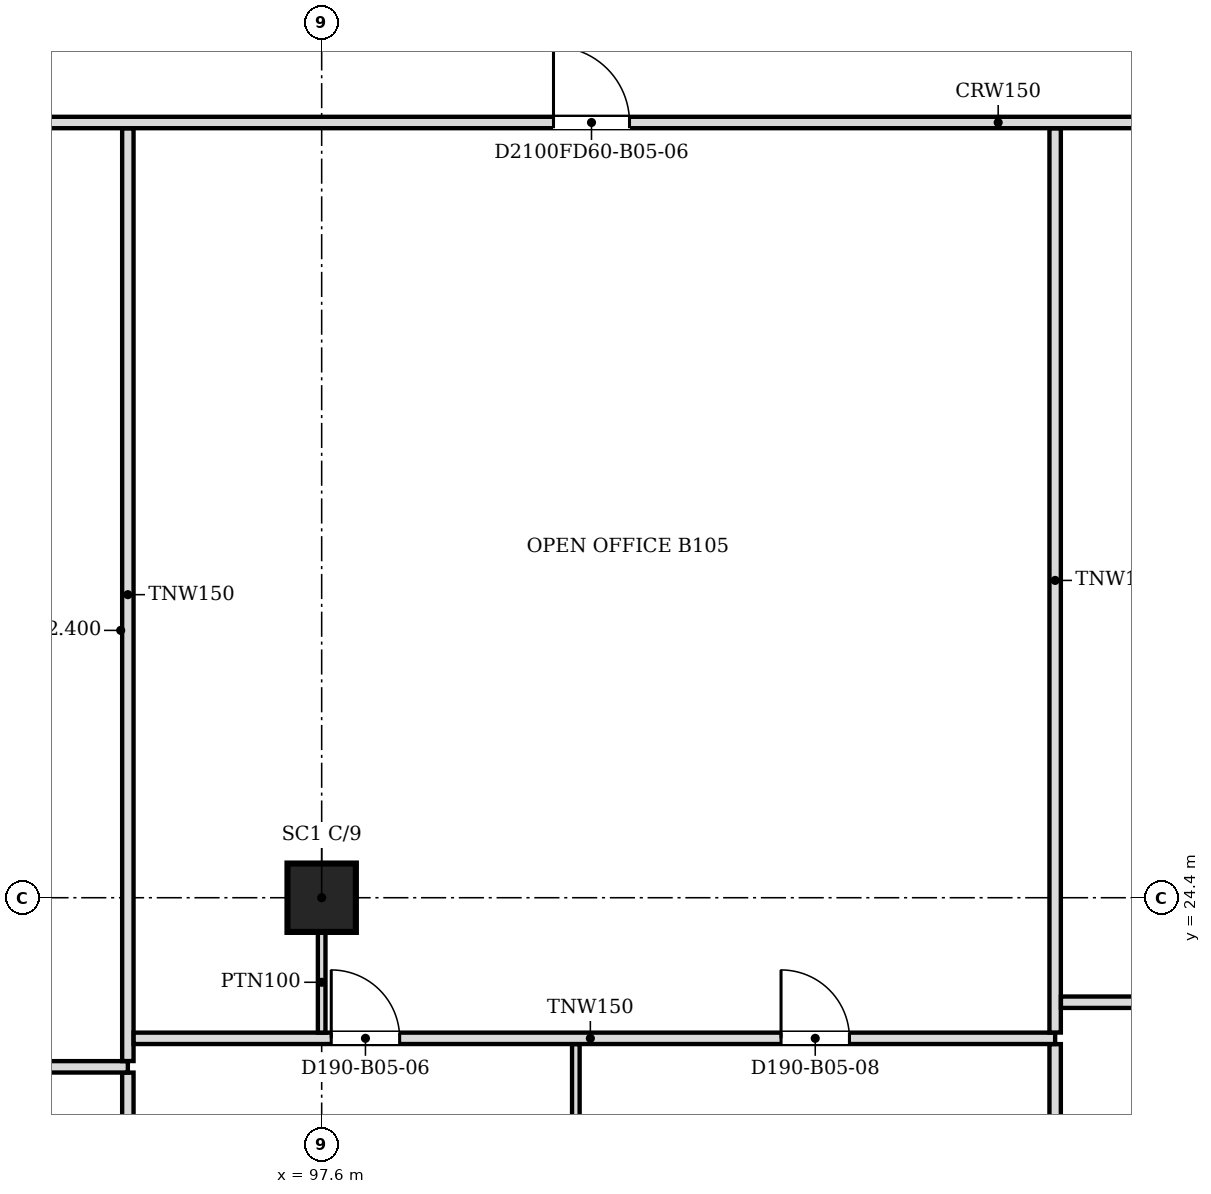
"""IFC4 building model, lengths in metres.
Left out: names, types, materials, properties, quantities, classifications, styles, units other than length and angle.
Written with IfcOpenShell. Run it as: python <this file> out.ifc"""

import sys

from ifc_helpers import new_model, si_unit, direction, frame, frame_2d, origin, origin_2d, place, context, subcontext, project, spatial, rectangle, extrude, source, transform, mapped, element, fill, save


model = new_model("IFC4")
c1 = context("Model", 3, precision=1e-05, world=origin(), true_north=direction((0.0, 1.0)))
c2 = subcontext(c1, "Body", "Model", "MODEL_VIEW")
j1 = project(units=[si_unit("LENGTHUNIT", "METRE"), si_unit("PLANEANGLEUNIT", "RADIAN")], contexts=[c1])
p1 = place(None, origin())
s1 = spatial("IfcSite", under=j1, at=p1, CompositionType="ELEMENT")
p2 = place(p1, origin())
s2 = spatial("IfcBuilding", under=s1, at=p2, CompositionType="ELEMENT")
p3 = place(p2, frame((0.0, 0.0, 52.4)))
s3 = spatial("IfcBuildingStorey", under=s2, at=p3, CompositionType="ELEMENT", Elevation=52.4)
p4 = place(p3, frame((97.6, 24.4, 0.0), z_axis=(0.0, 0.0, 1.0), x_axis=(1.0, 0.0, 0.0)))
e1 = element("IfcColumn", 1, at=p4, inside=s3, PredefinedType="COLUMN", context=c2, shape_type="SweptSolid", body=[
    extrude(rectangle(XDim=0.9, YDim=0.9, at=origin_2d()), origin(), (0.0, 0.0, 1.0), 3.6),
])
p5 = place(p3, frame((95.05, 18.8, 0.0), z_axis=(0.0, 0.0, 1.0), x_axis=(0.0, 1.0, 0.0)))
e2 = element("IfcWall", 2, at=p5, inside=s3, PredefinedType="PARTITIONING", context=c2, shape_type="SweptSolid", body=[
    extrude(rectangle(XDim=3.299, YDim=0.15, at=frame_2d((1.649, 0.0))), origin(), (0.0, 0.0, 1.0), 3.067),
])
p6 = place(p3, frame((100.944, 18.8, 0.0), z_axis=(0.0, 0.0, 1.0), x_axis=(0.0, 1.0, 0.0)))
e3 = element("IfcWall", 3, at=p6, inside=s3, PredefinedType="PARTITIONING", context=c2, shape_type="SweptSolid", body=[
    extrude(rectangle(XDim=3.674, YDim=0.1, at=frame_2d((1.837, 0.0))), origin(), (0.0, 0.0, 1.0), 3.067),
])
p7 = place(p3, frame((107.25, 18.8, 0.0), z_axis=(0.0, 0.0, 1.0), x_axis=(0.0, 1.0, 0.0)))
e4 = element("IfcWall", 4, at=p7, inside=s3, PredefinedType="PARTITIONING", context=c2, shape_type="SweptSolid", body=[
    extrude(rectangle(XDim=3.674, YDim=0.15, at=frame_2d((1.837, 0.0))), origin(), (0.0, 0.0, 1.0), 3.067),
])
p8 = place(p3, frame((95.05, 22.175, 0.0), z_axis=(0.0, 0.0, 1.0), x_axis=(-1.0, 0.0, 0.0)))
e5 = element("IfcWall", 5, at=p8, inside=s3, PredefinedType="PARTITIONING", context=c2, shape_type="SweptSolid", body=[
    extrude(rectangle(XDim=8.256, YDim=0.15, at=frame_2d((4.128, 0.0))), origin(), (0.0, 0.0, 1.0), 3.067),
])
m1 = source(origin(), c2, "Body", "SweptSolid", [
    extrude(rectangle(XDim=0.9, YDim=2.1, at=frame_2d((0.45, 1.05))), frame((0.0, 0.085, 0.0), z_axis=(0.0, -1.0, 0.0), x_axis=(1.0, 0.0, 0.0)), (0.0, 0.0, 1.0), 0.17),
])
p9 = place(p8, frame((6.056, 0.0, 0.0)))
e6 = element("IfcOpeningElement", 6, at=p9, cuts=e5, PredefinedType="OPENING", context=c2, shape_type="MappedRepresentation", body=[
    mapped(m1, transform((0.0, 0.0, 0.0), scale=1.0)),
])
p10 = place(p8, frame((1.93, 0.0, 0.0)))
e7 = element("IfcOpeningElement", 7, at=p10, cuts=e5, PredefinedType="OPENING", context=c2, shape_type="MappedRepresentation", body=[
    mapped(m1, transform((0.0, 0.0, 0.0), scale=1.0)),
])
p11 = place(p3, frame((95.05, 22.251, 0.0), z_axis=(0.0, 0.0, 1.0), x_axis=(0.0, 1.0, 0.0)))
e8 = element("IfcWall", 8, at=p11, inside=s3, PredefinedType="PARTITIONING", context=c2, shape_type="SweptSolid", body=[
    extrude(rectangle(XDim=12.273, YDim=0.15, at=frame_2d((6.136, 0.0))), origin(), (0.0, 0.0, 1.0), 3.067),
])
p12 = place(p3, frame((107.25, 22.55, 0.0), z_axis=(0.0, 0.0, 1.0), x_axis=(-1.0, 0.0, 0.0)))
e9 = element("IfcWall", 9, at=p12, inside=s3, PredefinedType="PARTITIONING", context=c2, shape_type="SweptSolid", body=[
    extrude(rectangle(XDim=12.124, YDim=0.15, at=frame_2d((6.062, 0.0))), origin(), (0.0, 0.0, 1.0), 3.067),
])
p13 = place(p12, frame((8.624, 0.0, 0.0)))
e10 = element("IfcOpeningElement", 10, at=p13, cuts=e9, PredefinedType="OPENING", context=c2, shape_type="MappedRepresentation", body=[
    mapped(m1, transform((0.0, 0.0, 0.0), scale=1.0)),
])
p14 = place(p12, frame((2.706, 0.0, 0.0)))
e11 = element("IfcOpeningElement", 11, at=p14, cuts=e9, PredefinedType="OPENING", context=c2, shape_type="MappedRepresentation", body=[
    mapped(m1, transform((0.0, 0.0, 0.0), scale=1.0)),
])
p15 = place(p3, frame((107.25, 22.626, 0.0), z_axis=(0.0, 0.0, 1.0), x_axis=(0.0, 1.0, 0.0)))
e12 = element("IfcWall", 12, at=p15, inside=s3, PredefinedType="PARTITIONING", context=c2, shape_type="SweptSolid", body=[
    extrude(rectangle(XDim=11.898, YDim=0.15, at=frame_2d((5.949, 0.0))), origin(), (0.0, 0.0, 1.0), 3.067),
])
p16 = place(p3, frame((116.4, 23.025, 0.0), z_axis=(0.0, 0.0, 1.0), x_axis=(-1.0, 0.0, 0.0)))
e13 = element("IfcWall", 13, at=p16, inside=s3, PredefinedType="PARTITIONING", context=c2, shape_type="SweptSolid", body=[
    extrude(rectangle(XDim=9.074, YDim=0.15, at=frame_2d((4.537, 0.0))), origin(), (0.0, 0.0, 1.0), 3.067),
])
p17 = place(p16, frame((7.074, 0.0, 0.0)))
e14 = element("IfcOpeningElement", 14, at=p17, cuts=e13, PredefinedType="OPENING", context=c2, shape_type="MappedRepresentation", body=[
    mapped(m1, transform((0.0, 0.0, 0.0), scale=1.0)),
])
p18 = place(p16, frame((1.93, 0.0, 0.0)))
e15 = element("IfcOpeningElement", 15, at=p18, cuts=e13, PredefinedType="OPENING", context=c2, shape_type="MappedRepresentation", body=[
    mapped(m1, transform((0.0, 0.0, 0.0), scale=1.0)),
])
p19 = place(p3, frame((97.6, 23.95, 0.0), z_axis=(0.0, 0.0, 1.0), x_axis=(0.0, -1.0, 0.0)))
e16 = element("IfcWall", 16, at=p19, inside=s3, PredefinedType="PARTITIONING", context=c2, shape_type="SweptSolid", body=[
    extrude(rectangle(XDim=1.325, YDim=0.1, at=frame_2d((0.663, 0.0))), origin(), (0.0, 0.0, 1.0), 3.067),
])
p20 = place(p3, frame((133.7, 34.6, 0.0), z_axis=(0.0, 0.0, 1.0), x_axis=(-1.0, 0.0, 0.0)))
e17 = element("IfcWall", 17, at=p20, inside=s3, PredefinedType="PARTITIONING", context=c2, shape_type="SweptSolid", body=[
    extrude(rectangle(XDim=47.8, YDim=0.15, at=frame_2d((23.9, 0.0))), origin(), (0.0, 0.0, 1.0), 3.067),
])
m2 = source(origin(), c2, "Body", "SweptSolid", [
    extrude(rectangle(XDim=1.0, YDim=2.1, at=frame_2d((0.5, 1.05))), frame((0.0, 0.085, 0.0), z_axis=(0.0, -1.0, 0.0), x_axis=(1.0, 0.0, 0.0)), (0.0, 0.0, 1.0), 0.17),
])
p21 = place(p20, frame((3.549, 0.0, 0.0)))
e18 = element("IfcOpeningElement", 18, at=p21, cuts=e17, PredefinedType="OPENING", context=c2, shape_type="MappedRepresentation", body=[
    mapped(m2, transform((0.0, 0.0, 0.0), scale=1.0)),
])
p22 = place(p20, frame((42.7, 0.0, 0.0)))
e19 = element("IfcOpeningElement", 19, at=p22, cuts=e17, PredefinedType="OPENING", context=c2, shape_type="MappedRepresentation", body=[
    mapped(m2, transform((0.0, 0.0, 0.0), scale=1.0)),
])
p23 = place(p20, frame((12.299, 0.0, 0.0)))
e20 = element("IfcOpeningElement", 20, at=p23, cuts=e17, PredefinedType="OPENING", context=c2, shape_type="MappedRepresentation", body=[
    mapped(m1, transform((0.0, 0.0, 0.0), scale=1.0)),
])
p24 = place(p20, frame((21.349, 0.0, 0.0)))
e21 = element("IfcOpeningElement", 21, at=p24, cuts=e17, PredefinedType="OPENING", context=c2, shape_type="MappedRepresentation", body=[
    mapped(m2, transform((0.0, 0.0, 0.0), scale=1.0)),
])
p25 = place(p20, frame((32.05, 0.0, 0.0)))
e22 = element("IfcOpeningElement", 22, at=p25, cuts=e17, PredefinedType="OPENING", context=c2, shape_type="MappedRepresentation", body=[
    mapped(m2, transform((0.0, 0.0, 0.0), scale=1.0)),
])
m3 = source(origin(), c2, "Body", "SweptSolid", [
    extrude(rectangle(XDim=0.9, YDim=2.1, at=frame_2d((0.45, 1.05))), frame((0.0, 0.025, 0.0), z_axis=(0.0, -1.0, 0.0), x_axis=(1.0, 0.0, 0.0)), (0.0, 0.0, 1.0), 0.05),
])
p26 = place(p13, origin())
e23 = element("IfcDoor", 23, at=p26, inside=s3, OperationType="SINGLE_SWING_RIGHT", PredefinedType="DOOR", context=c2, shape_type="MappedRepresentation", body=[
    mapped(m3, transform((0.0, 0.0, 0.0), scale=1.0)),
])
fill(e10, e23)
p27 = place(p14, origin())
e24 = element("IfcDoor", 24, at=p27, inside=s3, OperationType="SINGLE_SWING_RIGHT", PredefinedType="DOOR", context=c2, shape_type="MappedRepresentation", body=[
    mapped(m3, transform((0.0, 0.0, 0.0), scale=1.0)),
])
fill(e11, e24)
m4 = source(origin(), c2, "Body", "SweptSolid", [
    extrude(rectangle(XDim=1.0, YDim=2.1, at=frame_2d((0.5, 1.05))), frame((0.0, 0.025, 0.0), z_axis=(0.0, -1.0, 0.0), x_axis=(1.0, 0.0, 0.0)), (0.0, 0.0, 1.0), 0.05),
])
p28 = place(p25, origin())
e25 = element("IfcDoor", 25, at=p28, inside=s3, OperationType="SINGLE_SWING_RIGHT", PredefinedType="DOOR", context=c2, shape_type="MappedRepresentation", body=[
    mapped(m4, transform((0.0, 0.0, 0.0), scale=1.0)),
])
fill(e22, e25)
save(model, sys.argv[1])
